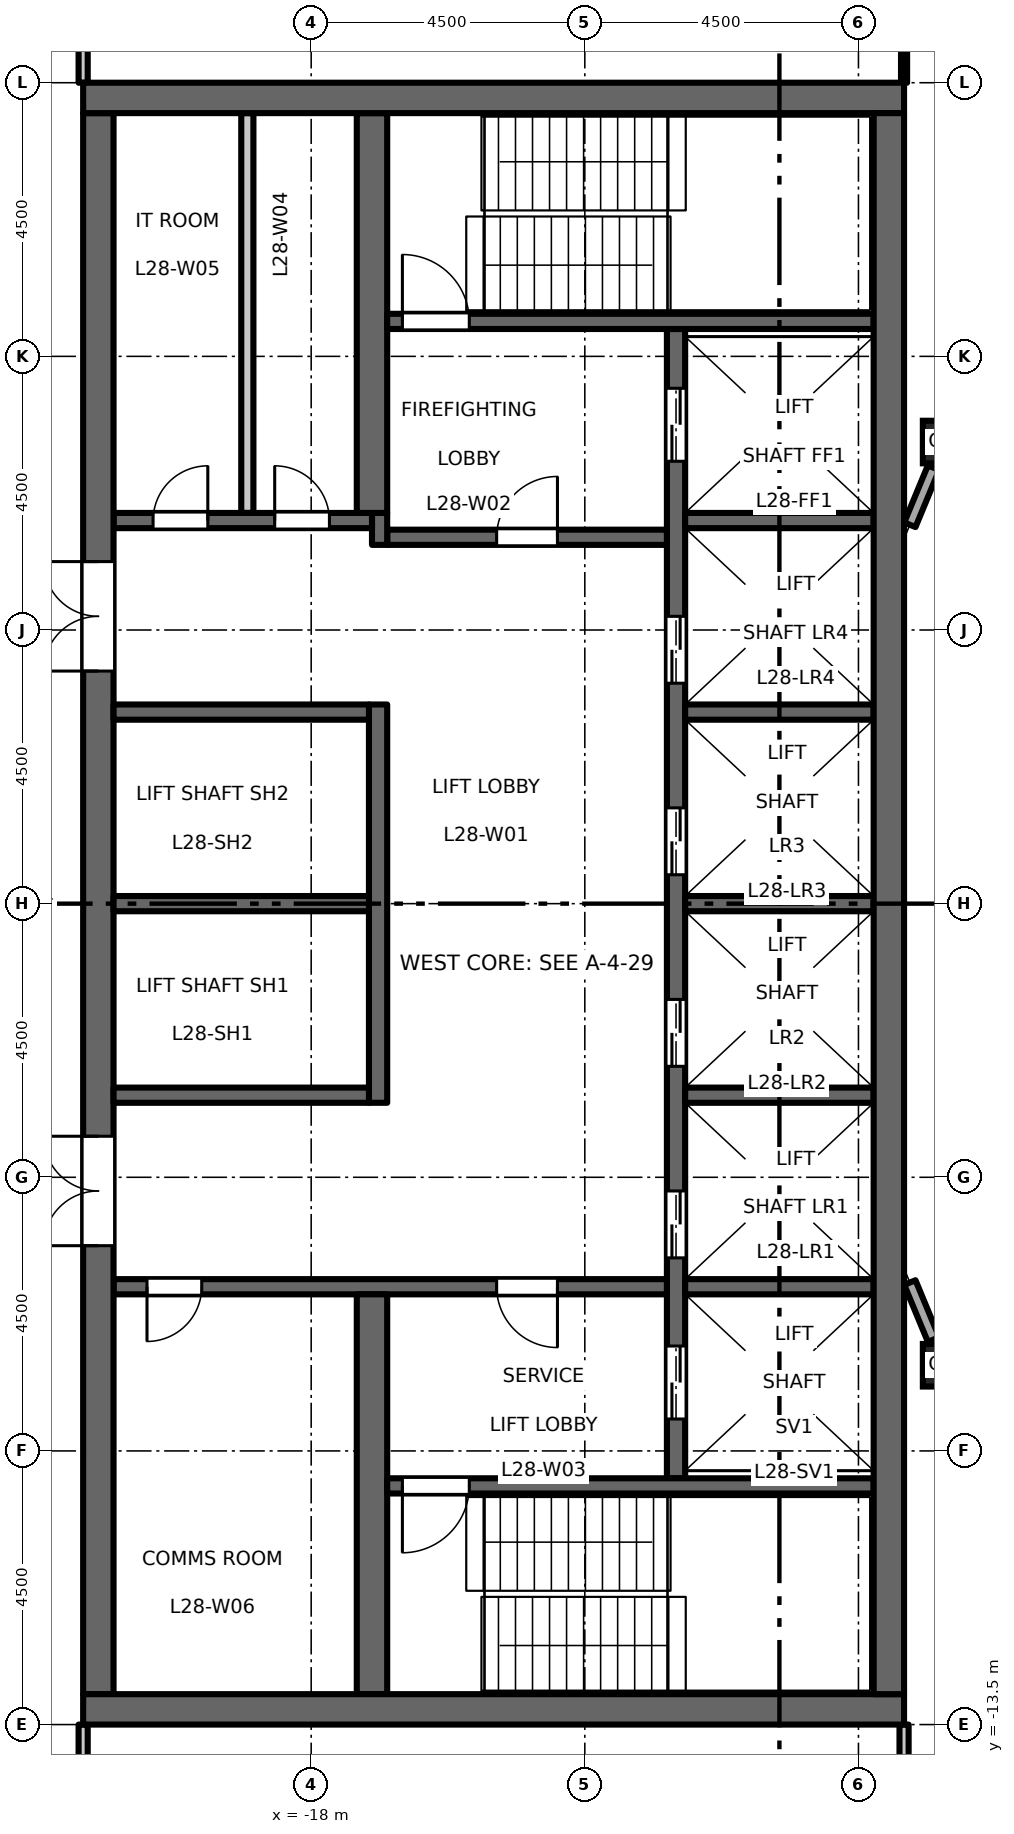
"""IFC4 building model, lengths in metres.
Left out: names, types, materials, properties, quantities, classifications, styles, units other than length and angle.
Written with IfcOpenShell. Run it as: python <this file> out.ifc"""

import sys

from ifc_helpers import new_model, si_unit, direction, frame, frame_2d, origin, origin_2d, place, context, subcontext, project, spatial, rectangle, hollow_rectangle, extrude, element, fill, save


model = new_model("IFC4")
c1 = context("Model", 3, precision=1e-05, world=origin(), true_north=direction((0.0, 1.0)))
c2 = subcontext(c1, "Body", "Model", "MODEL_VIEW")
j1 = project(units=[si_unit("LENGTHUNIT", "METRE"), si_unit("PLANEANGLEUNIT", "RADIAN")], contexts=[c1])
p1 = place(None, origin())
s1 = spatial("IfcSite", under=j1, at=p1, CompositionType="ELEMENT")
p2 = place(p1, origin())
s2 = spatial("IfcBuilding", under=s1, at=p2, CompositionType="ELEMENT")
p3 = place(p2, frame((0.0, 0.0, 131.7)))
s3 = spatial("IfcBuildingStorey", under=s2, at=p3, CompositionType="ELEMENT", Elevation=131.7)
for number, where, z_axis, x_axis in (
    (1, (-7.591, -7.591, 0.0), (0.0, 0.0, 1.0), (1.0, 0.0, 0.0)),
    (2, (-7.591, 7.591, 0.0), (0.0, 0.0, 1.0), (1.0, 0.0, 0.0)),
):
    element("IfcColumn", number, at=place(p3, frame(where, z_axis=z_axis, x_axis=x_axis)), inside=s3, PredefinedType="COLUMN", context=c2, shape_type="SweptSolid", body=[
        extrude(hollow_rectangle(XDim=0.7, YDim=0.7, WallThickness=0.04, at=origin_2d()), origin(), (0.0, 0.0, 1.0), 4.5),
    ])
p4 = place(p3, frame((-12.0, -9.45, 0.0), z_axis=(0.0, 0.0, 1.0), x_axis=(0.0, 1.0, 0.0)))
e3 = element("IfcWall", 3, at=p4, inside=s3, PredefinedType="SHEAR", context=c2, shape_type="SweptSolid", body=[
    extrude(rectangle(XDim=18.9, YDim=0.3, at=frame_2d((9.45, 0.0))), origin(), (0.0, 0.0, 1.0), 4.35),
])
p5 = place(p4, frame((3.625, 0.0, 0.0)))
e4 = element("IfcOpeningElement", 4, at=p5, cuts=e3, PredefinedType="OPENING", context=c2, shape_type="SweptSolid", body=[
    extrude(rectangle(XDim=1.1, YDim=2.1, at=frame_2d((0.55, 1.05))), frame((0.0, 0.16, 0.0), z_axis=(0.0, -1.0, 0.0), x_axis=(1.0, 0.0, 0.0)), (0.0, 0.0, 1.0), 0.32),
])
p6 = place(p4, frame((6.775, 0.0, 0.0)))
e5 = element("IfcOpeningElement", 5, at=p6, cuts=e3, PredefinedType="OPENING", context=c2, shape_type="SweptSolid", body=[
    extrude(rectangle(XDim=1.1, YDim=2.1, at=frame_2d((0.55, 1.05))), frame((0.0, 0.16, 0.0), z_axis=(0.0, -1.0, 0.0), x_axis=(1.0, 0.0, 0.0)), (0.0, 0.0, 1.0), 0.32),
])
p7 = place(p4, frame((9.925, 0.0, 0.0)))
e6 = element("IfcOpeningElement", 6, at=p7, cuts=e3, PredefinedType="OPENING", context=c2, shape_type="SweptSolid", body=[
    extrude(rectangle(XDim=1.1, YDim=2.1, at=frame_2d((0.55, 1.05))), frame((0.0, 0.16, 0.0), z_axis=(0.0, -1.0, 0.0), x_axis=(1.0, 0.0, 0.0)), (0.0, 0.0, 1.0), 0.32),
])
p8 = place(p4, frame((13.075, 0.0, 0.0)))
e7 = element("IfcOpeningElement", 7, at=p8, cuts=e3, PredefinedType="OPENING", context=c2, shape_type="SweptSolid", body=[
    extrude(rectangle(XDim=1.1, YDim=2.1, at=frame_2d((0.55, 1.05))), frame((0.0, 0.16, 0.0), z_axis=(0.0, -1.0, 0.0), x_axis=(1.0, 0.0, 0.0)), (0.0, 0.0, 1.0), 0.32),
])
p9 = place(p4, frame((16.725, 0.0, 0.0)))
e8 = element("IfcOpeningElement", 8, at=p9, cuts=e3, PredefinedType="OPENING", context=c2, shape_type="SweptSolid", body=[
    extrude(rectangle(XDim=1.2, YDim=2.1, at=frame_2d((0.6, 1.05))), frame((0.0, 0.16, 0.0), z_axis=(0.0, -1.0, 0.0), x_axis=(1.0, 0.0, 0.0)), (0.0, 0.0, 1.0), 0.32),
])
p10 = place(p4, frame((0.975, 0.0, 0.0)))
e9 = element("IfcOpeningElement", 9, at=p10, cuts=e3, PredefinedType="OPENING", context=c2, shape_type="SweptSolid", body=[
    extrude(rectangle(XDim=1.2, YDim=2.1, at=frame_2d((0.6, 1.05))), frame((0.0, 0.16, 0.0), z_axis=(0.0, -1.0, 0.0), x_axis=(1.0, 0.0, 0.0)), (0.0, 0.0, 1.0), 0.32),
])
p11 = place(p3, frame((-12.15, 6.025, 0.0), z_axis=(0.0, 0.0, 1.0), x_axis=(-1.0, 0.0, 0.0)))
e10 = element("IfcWall", 10, at=p11, inside=s3, PredefinedType="SHEAR", context=c2, shape_type="SweptSolid", body=[
    extrude(rectangle(XDim=4.6, YDim=0.25, at=frame_2d((2.3, 0.0))), origin(), (0.0, 0.0, 1.0), 4.35),
])
p12 = place(p11, frame((1.8, 0.0, 0.0)))
e11 = element("IfcOpeningElement", 11, at=p12, cuts=e10, PredefinedType="OPENING", context=c2, shape_type="SweptSolid", body=[
    extrude(rectangle(XDim=1.0, YDim=2.1, at=frame_2d((0.5, 1.05))), frame((0.0, 0.135, 0.0), z_axis=(0.0, -1.0, 0.0), x_axis=(1.0, 0.0, 0.0)), (0.0, 0.0, 1.0), 0.27),
])
p13 = place(p3, frame((-16.875, 5.9, 0.0), z_axis=(0.0, 0.0, 1.0), x_axis=(0.0, 1.0, 0.0)))
e12 = element("IfcWall", 12, at=p13, inside=s3, PredefinedType="SHEAR", context=c2, shape_type="SweptSolid", body=[
    extrude(rectangle(XDim=0.525, YDim=0.25, at=frame_2d((0.263, 0.0))), origin(), (0.0, 0.0, 1.0), 4.35),
])
p14 = place(p3, frame((-17.0, 6.3, 0.0), z_axis=(0.0, 0.0, 1.0), x_axis=(-1.0, 0.0, 0.0)))
e13 = element("IfcWall", 13, at=p14, inside=s3, PredefinedType="SHEAR", context=c2, shape_type="SweptSolid", body=[
    extrude(rectangle(XDim=4.25, YDim=0.25, at=frame_2d((2.125, 0.0))), origin(), (0.0, 0.0, 1.0), 4.35),
])
p15 = place(p14, frame((0.7, 0.0, 0.0)))
e14 = element("IfcOpeningElement", 14, at=p15, cuts=e13, PredefinedType="OPENING", context=c2, shape_type="SweptSolid", body=[
    extrude(rectangle(XDim=0.9, YDim=2.1, at=frame_2d((0.45, 1.05))), frame((0.0, 0.135, 0.0), z_axis=(0.0, -1.0, 0.0), x_axis=(1.0, 0.0, 0.0)), (0.0, 0.0, 1.0), 0.27),
])
p16 = place(p14, frame((2.7, 0.0, 0.0)))
e15 = element("IfcOpeningElement", 15, at=p16, cuts=e13, PredefinedType="OPENING", context=c2, shape_type="SweptSolid", body=[
    extrude(rectangle(XDim=0.9, YDim=2.1, at=frame_2d((0.45, 1.05))), frame((0.0, 0.135, 0.0), z_axis=(0.0, -1.0, 0.0), x_axis=(1.0, 0.0, 0.0)), (0.0, 0.0, 1.0), 0.27),
])
p17 = place(p3, frame((-12.15, -6.3, 0.0), z_axis=(0.0, 0.0, 1.0), x_axis=(-1.0, 0.0, 0.0)))
e16 = element("IfcWall", 16, at=p17, inside=s3, PredefinedType="SHEAR", context=c2, shape_type="SweptSolid", body=[
    extrude(rectangle(XDim=9.1, YDim=0.25, at=frame_2d((4.55, 0.0))), origin(), (0.0, 0.0, 1.0), 4.35),
])
p18 = place(p17, frame((1.8, 0.0, 0.0)))
e17 = element("IfcOpeningElement", 17, at=p18, cuts=e16, PredefinedType="OPENING", context=c2, shape_type="SweptSolid", body=[
    extrude(rectangle(XDim=1.0, YDim=2.1, at=frame_2d((0.5, 1.05))), frame((0.0, 0.135, 0.0), z_axis=(0.0, -1.0, 0.0), x_axis=(1.0, 0.0, 0.0)), (0.0, 0.0, 1.0), 0.27),
])
p19 = place(p17, frame((7.65, 0.0, 0.0)))
e18 = element("IfcOpeningElement", 18, at=p19, cuts=e16, PredefinedType="OPENING", context=c2, shape_type="SweptSolid", body=[
    extrude(rectangle(XDim=0.9, YDim=2.1, at=frame_2d((0.45, 1.05))), frame((0.0, 0.135, 0.0), z_axis=(0.0, -1.0, 0.0), x_axis=(1.0, 0.0, 0.0)), (0.0, 0.0, 1.0), 0.27),
])
p20 = place(p3, frame((-21.5, -13.0, 0.0), z_axis=(0.0, 0.0, 1.0), x_axis=(0.0, 1.0, 0.0)))
e19 = element("IfcWall", 19, at=p20, inside=s3, PredefinedType="SHEAR", context=c2, shape_type="SweptSolid", body=[
    extrude(rectangle(XDim=26.0, YDim=0.5, at=frame_2d((13.0, 0.0))), origin(), (0.0, 0.0, 1.0), 4.35),
])
p21 = place(p20, frame((16.825, 0.0, 0.0)))
e20 = element("IfcOpeningElement", 20, at=p21, cuts=e19, PredefinedType="OPENING", context=c2, shape_type="SweptSolid", body=[
    extrude(rectangle(XDim=1.8, YDim=2.1, at=frame_2d((0.9, 1.05))), frame((0.0, 0.26, 0.0), z_axis=(0.0, -1.0, 0.0), x_axis=(1.0, 0.0, 0.0)), (0.0, 0.0, 1.0), 0.52),
])
p22 = place(p20, frame((7.375, 0.0, 0.0)))
e21 = element("IfcOpeningElement", 21, at=p22, cuts=e19, PredefinedType="OPENING", context=c2, shape_type="SweptSolid", body=[
    extrude(rectangle(XDim=1.8, YDim=2.1, at=frame_2d((0.9, 1.05))), frame((0.0, 0.26, 0.0), z_axis=(0.0, -1.0, 0.0), x_axis=(1.0, 0.0, 0.0)), (0.0, 0.0, 1.0), 0.52),
])
p23 = place(p3, frame((-19.05, 6.425, 0.0), z_axis=(0.0, 0.0, 1.0), x_axis=(0.0, 1.0, 0.0)))
e22 = element("IfcWall", 22, at=p23, inside=s3, PredefinedType="PARTITIONING", context=c2, shape_type="SweptSolid", body=[
    extrude(rectangle(XDim=6.575, YDim=0.2, at=frame_2d((3.288, 0.0))), origin(), (0.0, 0.0, 1.0), 4.35),
])
p24 = place(p3, frame((-16.9, -3.275, 0.0), z_axis=(0.0, 0.0, 1.0), x_axis=(0.0, 1.0, 0.0)))
e23 = element("IfcWall", 23, at=p24, inside=s3, PredefinedType="SHEAR", context=c2, shape_type="SweptSolid", body=[
    extrude(rectangle(XDim=6.55, YDim=0.3, at=frame_2d((3.275, 0.0))), origin(), (0.0, 0.0, 1.0), 4.35),
])
for number, where, z_axis, x_axis in (
    (24, (-17.05, 0.0, 0.0), (0.0, 0.0, 1.0), (-1.0, 0.0, 0.0)),
    (25, (-17.05, 3.15, 0.0), (0.0, 0.0, 1.0), (-1.0, 0.0, 0.0)),
    (26, (-17.05, -3.15, 0.0), (0.0, 0.0, 1.0), (-1.0, 0.0, 0.0)),
):
    element("IfcWall", number, at=place(p3, frame(where, z_axis=z_axis, x_axis=x_axis)), inside=s3, PredefinedType="SHEAR", context=c2, shape_type="SweptSolid", body=[
        extrude(rectangle(XDim=4.2, YDim=0.25, at=frame_2d((2.1, 0.0))), origin(), (0.0, 0.0, 1.0), 4.35),
    ])
for number, where, z_axis, x_axis in (
    (27, (-17.0, 6.425, 0.0), (0.0, 0.0, 1.0), (0.0, 1.0, 0.0)),
    (28, (-17.0, -13.0, 0.0), (0.0, 0.0, 1.0), (0.0, 1.0, 0.0)),
):
    element("IfcWall", number, at=place(p3, frame(where, z_axis=z_axis, x_axis=x_axis)), inside=s3, PredefinedType="SHEAR", context=c2, shape_type="SweptSolid", body=[
        extrude(rectangle(XDim=6.575, YDim=0.5, at=frame_2d((3.288, 0.0))), origin(), (0.0, 0.0, 1.0), 4.35),
    ])
for number, where, z_axis, x_axis in (
    (29, (-8.75, 0.0, 0.0), (0.0, 0.0, 1.0), (-1.0, 0.0, 0.0)),
    (30, (-8.75, 3.15, 0.0), (0.0, 0.0, 1.0), (-1.0, 0.0, 0.0)),
    (31, (-8.75, 6.3, 0.0), (0.0, 0.0, 1.0), (-1.0, 0.0, 0.0)),
    (32, (-8.75, -3.15, 0.0), (0.0, 0.0, 1.0), (-1.0, 0.0, 0.0)),
    (33, (-8.75, -6.3, 0.0), (0.0, 0.0, 1.0), (-1.0, 0.0, 0.0)),
):
    element("IfcWall", number, at=place(p3, frame(where, z_axis=z_axis, x_axis=x_axis)), inside=s3, PredefinedType="SHEAR", context=c2, shape_type="SweptSolid", body=[
        extrude(rectangle(XDim=3.1, YDim=0.25, at=frame_2d((1.55, 0.0))), origin(), (0.0, 0.0, 1.0), 4.35),
    ])
p25 = place(p3, frame((-8.75, 9.575, 0.0), z_axis=(0.0, 0.0, 1.0), x_axis=(-1.0, 0.0, 0.0)))
e34 = element("IfcWall", 34, at=p25, inside=s3, PredefinedType="SHEAR", context=c2, shape_type="SweptSolid", body=[
    extrude(rectangle(XDim=8.0, YDim=0.25, at=frame_2d((4.0, 0.0))), origin(), (0.0, 0.0, 1.0), 4.35),
])
p26 = place(p25, frame((6.65, 0.0, 0.0)))
e35 = element("IfcOpeningElement", 35, at=p26, cuts=e34, PredefinedType="OPENING", context=c2, shape_type="SweptSolid", body=[
    extrude(rectangle(XDim=1.1, YDim=2.1, at=frame_2d((0.55, 1.05))), frame((0.0, 0.135, 0.0), z_axis=(0.0, -1.0, 0.0), x_axis=(1.0, 0.0, 0.0)), (0.0, 0.0, 1.0), 0.27),
])
p27 = place(p3, frame((-8.75, -9.575, 0.0), z_axis=(0.0, 0.0, 1.0), x_axis=(-1.0, 0.0, 0.0)))
e36 = element("IfcWall", 36, at=p27, inside=s3, PredefinedType="SHEAR", context=c2, shape_type="SweptSolid", body=[
    extrude(rectangle(XDim=8.0, YDim=0.25, at=frame_2d((4.0, 0.0))), origin(), (0.0, 0.0, 1.0), 4.35),
])
p28 = place(p27, frame((6.65, 0.0, 0.0)))
e37 = element("IfcOpeningElement", 37, at=p28, cuts=e36, PredefinedType="OPENING", context=c2, shape_type="SweptSolid", body=[
    extrude(rectangle(XDim=1.1, YDim=2.1, at=frame_2d((0.55, 1.05))), frame((0.0, 0.135, 0.0), z_axis=(0.0, -1.0, 0.0), x_axis=(1.0, 0.0, 0.0)), (0.0, 0.0, 1.0), 0.27),
])
for number, where, z_axis, x_axis in (
    (38, (-8.25, 13.25, 0.0), (0.0, 0.0, 1.0), (-1.0, 0.0, 0.0)),
    (39, (-8.25, -13.25, 0.0), (0.0, 0.0, 1.0), (-1.0, 0.0, 0.0)),
):
    element("IfcWall", number, at=place(p3, frame(where, z_axis=z_axis, x_axis=x_axis)), inside=s3, PredefinedType="SHEAR", context=c2, shape_type="SweptSolid", body=[
        extrude(rectangle(XDim=13.5, YDim=0.5, at=frame_2d((6.75, 0.0))), origin(), (0.0, 0.0, 1.0), 4.35),
    ])
p29 = place(p3, frame((-8.5, -13.0, 0.0), z_axis=(0.0, 0.0, 1.0), x_axis=(0.0, 1.0, 0.0)))
e40 = element("IfcWall", 40, at=p29, inside=s3, PredefinedType="SHEAR", context=c2, shape_type="SweptSolid", body=[
    extrude(rectangle(XDim=26.0, YDim=0.5, at=frame_2d((13.0, 0.0))), origin(), (0.0, 0.0, 1.0), 4.35),
])
for number, where, z_axis, x_axis in (
    (41, (-7.766, 7.168, 0.0), (0.0, 0.0, 1.0), (-0.383, -0.924, 0.0)),
    (42, (-8.154, -6.231, 0.0), (0.0, 0.0, 1.0), (0.383, -0.924, 0.0)),
):
    element("IfcWall", number, at=place(p3, frame(where, z_axis=z_axis, x_axis=x_axis)), inside=s3, PredefinedType="STANDARD", context=c2, shape_type="SweptSolid", body=[
        extrude(rectangle(XDim=1.015, YDim=0.2, at=frame_2d((0.507, 0.0))), origin(), (0.0, 0.0, 1.0), 3.826),
    ])
for number, where, z_axis, x_axis in (
    (43, (-21.75, -18.925, 0.0), (0.0, 0.0, 1.0), (0.0, 1.0, 0.0)),
    (44, (-21.75, 13.5, 0.0), (0.0, 0.0, 1.0), (0.0, 1.0, 0.0)),
):
    element("IfcWall", number, at=place(p3, frame(where, z_axis=z_axis, x_axis=x_axis)), inside=s3, PredefinedType="PARTITIONING", context=c2, shape_type="SweptSolid", body=[
        extrude(rectangle(XDim=5.425, YDim=0.15, at=frame_2d((2.712, 0.0))), origin(), (0.0, 0.0, 1.0), 4.35),
    ])
p30 = place(p3, frame((-8.25, 13.5, 0.0), z_axis=(0.0, 0.0, 1.0), x_axis=(0.0, 1.0, 0.0)))
e45 = element("IfcWall", 45, at=p30, inside=s3, PredefinedType="PARTITIONING", context=c2, shape_type="SweptSolid", body=[
    extrude(rectangle(XDim=5.425, YDim=0.1, at=frame_2d((2.712, 0.0))), origin(), (0.0, 0.0, 1.0), 4.35),
])
p31 = place(p3, frame((-8.25, -18.925, 0.0), z_axis=(0.0, 0.0, 1.0), x_axis=(0.0, 1.0, 0.0)))
e46 = element("IfcWall", 46, at=p31, inside=s3, PredefinedType="PARTITIONING", context=c2, shape_type="SweptSolid", body=[
    extrude(rectangle(XDim=5.425, YDim=0.15, at=frame_2d((2.712, 0.0))), origin(), (0.0, 0.0, 1.0), 4.35),
])
p32 = place(p12, origin())
e47 = element("IfcDoor", 47, at=p32, inside=s3, OperationType="SINGLE_SWING_LEFT", PredefinedType="DOOR", context=c2, shape_type="SweptSolid", body=[
    extrude(rectangle(XDim=1.0, YDim=2.1, at=frame_2d((0.5, 1.05))), frame((0.0, 0.025, 0.0), z_axis=(0.0, -1.0, 0.0), x_axis=(1.0, 0.0, 0.0)), (0.0, 0.0, 1.0), 0.05),
])
fill(e11, e47)
p33 = place(p18, origin())
e48 = element("IfcDoor", 48, at=p33, inside=s3, OperationType="SINGLE_SWING_RIGHT", PredefinedType="DOOR", context=c2, shape_type="SweptSolid", body=[
    extrude(rectangle(XDim=1.0, YDim=2.1, at=frame_2d((0.5, 1.05))), frame((0.0, 0.025, 0.0), z_axis=(0.0, -1.0, 0.0), x_axis=(1.0, 0.0, 0.0)), (0.0, 0.0, 1.0), 0.05),
])
fill(e17, e48)
p34 = place(p26, origin())
e49 = element("IfcDoor", 49, at=p34, inside=s3, OperationType="SINGLE_SWING_RIGHT", PredefinedType="DOOR", context=c2, shape_type="SweptSolid", body=[
    extrude(rectangle(XDim=1.1, YDim=2.1, at=frame_2d((0.55, 1.05))), frame((0.0, 0.025, 0.0), z_axis=(0.0, -1.0, 0.0), x_axis=(1.0, 0.0, 0.0)), (0.0, 0.0, 1.0), 0.05),
])
fill(e35, e49)
p35 = place(p28, origin())
e50 = element("IfcDoor", 50, at=p35, inside=s3, OperationType="SINGLE_SWING_LEFT", PredefinedType="DOOR", context=c2, shape_type="SweptSolid", body=[
    extrude(rectangle(XDim=1.1, YDim=2.1, at=frame_2d((0.55, 1.05))), frame((0.0, 0.025, 0.0), z_axis=(0.0, -1.0, 0.0), x_axis=(1.0, 0.0, 0.0)), (0.0, 0.0, 1.0), 0.05),
])
fill(e37, e50)
p36 = place(p21, origin())
e51 = element("IfcDoor", 51, at=p36, inside=s3, OperationType="DOUBLE_DOOR_DOUBLE_SWING", PredefinedType="DOOR", context=c2, shape_type="SweptSolid", body=[
    extrude(rectangle(XDim=1.8, YDim=2.1, at=frame_2d((0.9, 1.05))), frame((0.0, 0.025, 0.0), z_axis=(0.0, -1.0, 0.0), x_axis=(1.0, 0.0, 0.0)), (0.0, 0.0, 1.0), 0.05),
])
fill(e20, e51)
p37 = place(p22, origin())
e52 = element("IfcDoor", 52, at=p37, inside=s3, OperationType="DOUBLE_DOOR_DOUBLE_SWING", PredefinedType="DOOR", context=c2, shape_type="SweptSolid", body=[
    extrude(rectangle(XDim=1.8, YDim=2.1, at=frame_2d((0.9, 1.05))), frame((0.0, 0.025, 0.0), z_axis=(0.0, -1.0, 0.0), x_axis=(1.0, 0.0, 0.0)), (0.0, 0.0, 1.0), 0.05),
])
fill(e21, e52)
p38 = place(p5, origin())
e53 = element("IfcDoor", 53, at=p38, inside=s3, OperationType="DOUBLE_DOOR_SLIDING", PredefinedType="DOOR", context=c2, shape_type="SweptSolid", body=[
    extrude(rectangle(XDim=1.1, YDim=2.1, at=frame_2d((0.55, 1.05))), frame((0.0, 0.025, 0.0), z_axis=(0.0, -1.0, 0.0), x_axis=(1.0, 0.0, 0.0)), (0.0, 0.0, 1.0), 0.05),
])
fill(e4, e53)
p39 = place(p6, origin())
e54 = element("IfcDoor", 54, at=p39, inside=s3, OperationType="DOUBLE_DOOR_SLIDING", PredefinedType="DOOR", context=c2, shape_type="SweptSolid", body=[
    extrude(rectangle(XDim=1.1, YDim=2.1, at=frame_2d((0.55, 1.05))), frame((0.0, 0.025, 0.0), z_axis=(0.0, -1.0, 0.0), x_axis=(1.0, 0.0, 0.0)), (0.0, 0.0, 1.0), 0.05),
])
fill(e5, e54)
p40 = place(p7, origin())
e55 = element("IfcDoor", 55, at=p40, inside=s3, OperationType="DOUBLE_DOOR_SLIDING", PredefinedType="DOOR", context=c2, shape_type="SweptSolid", body=[
    extrude(rectangle(XDim=1.1, YDim=2.1, at=frame_2d((0.55, 1.05))), frame((0.0, 0.025, 0.0), z_axis=(0.0, -1.0, 0.0), x_axis=(1.0, 0.0, 0.0)), (0.0, 0.0, 1.0), 0.05),
])
fill(e6, e55)
p41 = place(p8, origin())
e56 = element("IfcDoor", 56, at=p41, inside=s3, OperationType="DOUBLE_DOOR_SLIDING", PredefinedType="DOOR", context=c2, shape_type="SweptSolid", body=[
    extrude(rectangle(XDim=1.1, YDim=2.1, at=frame_2d((0.55, 1.05))), frame((0.0, 0.025, 0.0), z_axis=(0.0, -1.0, 0.0), x_axis=(1.0, 0.0, 0.0)), (0.0, 0.0, 1.0), 0.05),
])
fill(e7, e56)
p42 = place(p9, origin())
e57 = element("IfcDoor", 57, at=p42, inside=s3, OperationType="DOUBLE_DOOR_SLIDING", PredefinedType="DOOR", context=c2, shape_type="SweptSolid", body=[
    extrude(rectangle(XDim=1.2, YDim=2.1, at=frame_2d((0.6, 1.05))), frame((0.0, 0.025, 0.0), z_axis=(0.0, -1.0, 0.0), x_axis=(1.0, 0.0, 0.0)), (0.0, 0.0, 1.0), 0.05),
])
fill(e8, e57)
p43 = place(p10, origin())
e58 = element("IfcDoor", 58, at=p43, inside=s3, OperationType="DOUBLE_DOOR_SLIDING", PredefinedType="DOOR", context=c2, shape_type="SweptSolid", body=[
    extrude(rectangle(XDim=1.2, YDim=2.1, at=frame_2d((0.6, 1.05))), frame((0.0, 0.025, 0.0), z_axis=(0.0, -1.0, 0.0), x_axis=(1.0, 0.0, 0.0)), (0.0, 0.0, 1.0), 0.05),
])
fill(e9, e58)
p44 = place(p15, origin())
e59 = element("IfcDoor", 59, at=p44, inside=s3, OperationType="SINGLE_SWING_RIGHT", PredefinedType="DOOR", context=c2, shape_type="SweptSolid", body=[
    extrude(rectangle(XDim=0.9, YDim=2.1, at=frame_2d((0.45, 1.05))), frame((0.0, 0.025, 0.0), z_axis=(0.0, -1.0, 0.0), x_axis=(1.0, 0.0, 0.0)), (0.0, 0.0, 1.0), 0.05),
])
fill(e14, e59)
p45 = place(p16, origin())
e60 = element("IfcDoor", 60, at=p45, inside=s3, OperationType="SINGLE_SWING_LEFT", PredefinedType="DOOR", context=c2, shape_type="SweptSolid", body=[
    extrude(rectangle(XDim=0.9, YDim=2.1, at=frame_2d((0.45, 1.05))), frame((0.0, 0.025, 0.0), z_axis=(0.0, -1.0, 0.0), x_axis=(1.0, 0.0, 0.0)), (0.0, 0.0, 1.0), 0.05),
])
fill(e15, e60)
p46 = place(p19, origin())
e61 = element("IfcDoor", 61, at=p46, inside=s3, OperationType="SINGLE_SWING_LEFT", PredefinedType="DOOR", context=c2, shape_type="SweptSolid", body=[
    extrude(rectangle(XDim=0.9, YDim=2.1, at=frame_2d((0.45, 1.05))), frame((0.0, 0.025, 0.0), z_axis=(0.0, -1.0, 0.0), x_axis=(1.0, 0.0, 0.0)), (0.0, 0.0, 1.0), 0.05),
])
fill(e18, e61)
save(model, sys.argv[1])
